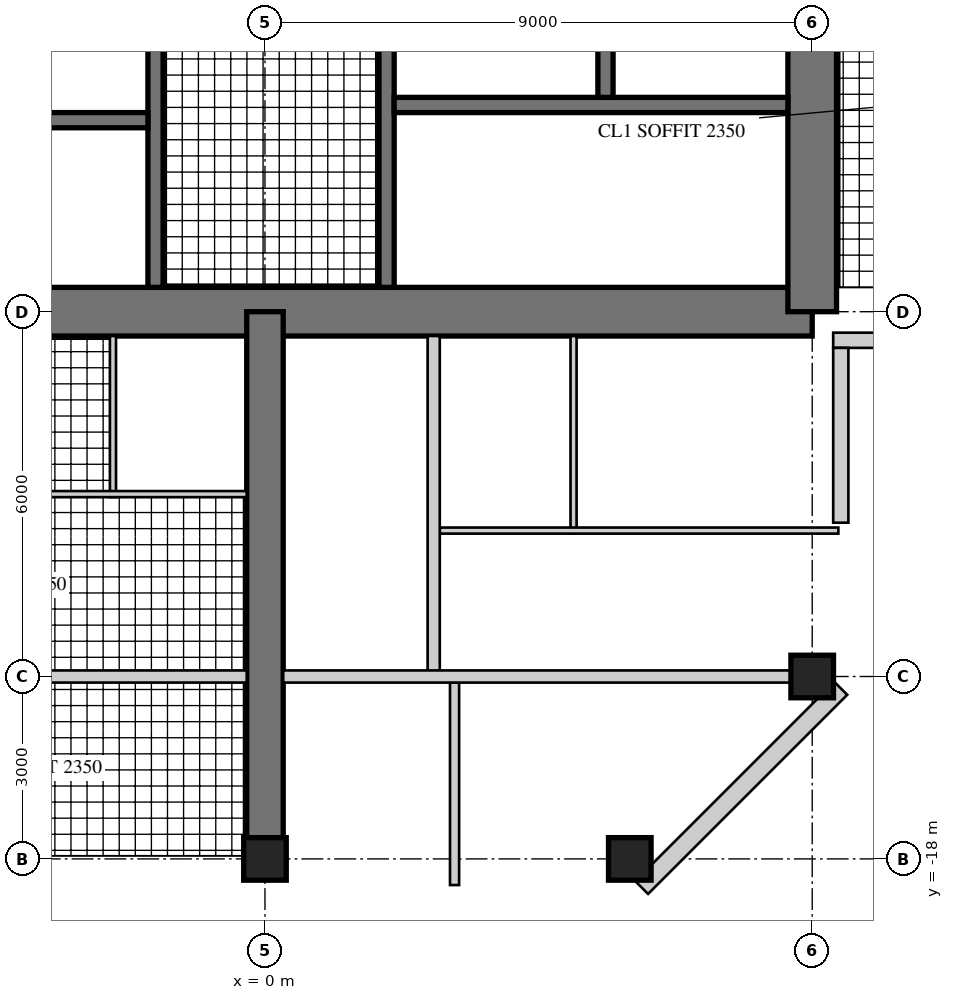
"""IFC4 building model, lengths in metres.
Left out: names, types, materials, properties, quantities, classifications, styles, units other than length and angle.
Written with IfcOpenShell. Run it as: python <this file> out.ifc"""

import sys

from ifc_helpers import new_model, si_unit, direction, frame, frame_2d, origin, origin_2d, place, context, subcontext, project, spatial, rectangle, hollow_rectangle, extrude, element, fill, save


model = new_model("IFC4")
c1 = context("Model", 3, precision=1e-05, world=origin(), true_north=direction((0.0, 1.0)))
c2 = subcontext(c1, "Body", "Model", "MODEL_VIEW")
j1 = project(units=[si_unit("LENGTHUNIT", "METRE"), si_unit("PLANEANGLEUNIT", "RADIAN")], contexts=[c1])
p1 = place(None, origin())
s1 = spatial("IfcSite", under=j1, at=p1, CompositionType="ELEMENT")
p2 = place(p1, origin())
s2 = spatial("IfcBuilding", under=s1, at=p2, CompositionType="ELEMENT")
p3 = place(p2, frame((0.0, 0.0, 261.1)))
s3 = spatial("IfcBuildingStorey", under=s2, at=p3, CompositionType="ELEMENT", Elevation=261.1)
p4 = place(p3, frame((-9.0, -9.0, 0.0), z_axis=(0.0, 0.0, 1.0), x_axis=(1.0, 0.0, 0.0)))
e1 = element("IfcWall", 1, at=p4, inside=s3, PredefinedType="SHEAR", context=c2, shape_type="SweptSolid", body=[
    extrude(rectangle(XDim=18.0, YDim=0.8, at=frame_2d((9.0, 0.0))), origin(), (0.0, 0.0, 1.0), 3.4),
])
p5 = place(p4, frame((9.8, 0.0, 0.0)))
e2 = element("IfcOpeningElement", 2, at=p5, cuts=e1, PredefinedType="OPENING", context=c2, shape_type="SweptSolid", body=[
    extrude(rectangle(XDim=1.0, YDim=2.4, at=frame_2d((0.5, 1.2))), frame((0.0, 0.41, 0.0), z_axis=(0.0, -1.0, 0.0), x_axis=(1.0, 0.0, 0.0)), (0.0, 0.0, 1.0), 0.82),
])
p6 = place(p3, frame((9.0, -9.0, 0.0), z_axis=(0.0, 0.0, 1.0), x_axis=(0.0, 1.0, 0.0)))
e3 = element("IfcWall", 3, at=p6, inside=s3, PredefinedType="SHEAR", context=c2, shape_type="SweptSolid", body=[
    extrude(rectangle(XDim=18.0, YDim=0.8, at=frame_2d((9.0, 0.0))), origin(), (0.0, 0.0, 1.0), 3.4),
])
p7 = place(p6, frame((9.8, 0.0, 0.0)))
e4 = element("IfcOpeningElement", 4, at=p7, cuts=e3, PredefinedType="OPENING", context=c2, shape_type="SweptSolid", body=[
    extrude(rectangle(XDim=1.0, YDim=2.4, at=frame_2d((0.5, 1.2))), frame((0.0, 0.41, 0.0), z_axis=(0.0, -1.0, 0.0), x_axis=(1.0, 0.0, 0.0)), (0.0, 0.0, 1.0), 0.82),
])
p8 = place(p3, frame((-1.8, -1.875, 0.0), z_axis=(0.0, 0.0, 1.0), x_axis=(0.0, -1.0, 0.0)))
e5 = element("IfcWall", 5, at=p8, inside=s3, PredefinedType="SHEAR", context=c2, shape_type="SweptSolid", body=[
    extrude(rectangle(XDim=6.725, YDim=0.25, at=frame_2d((3.363, 0.0))), origin(), (0.0, 0.0, 1.0), 3.4),
])
p9 = place(p8, frame((1.875, 0.0, 0.0)))
e6 = element("IfcOpeningElement", 6, at=p9, cuts=e5, PredefinedType="OPENING", context=c2, shape_type="SweptSolid", body=[
    extrude(rectangle(XDim=1.6, YDim=2.4, at=frame_2d((0.8, 1.2))), frame((0.0, 0.135, 0.0), z_axis=(0.0, -1.0, 0.0), x_axis=(1.0, 0.0, 0.0)), (0.0, 0.0, 1.0), 0.27),
])
p10 = place(p3, frame((-1.925, -5.85, 0.0), z_axis=(0.0, 0.0, 1.0), x_axis=(-1.0, 0.0, 0.0)))
e7 = element("IfcWall", 7, at=p10, inside=s3, PredefinedType="SHEAR", context=c2, shape_type="SweptSolid", body=[
    extrude(rectangle(XDim=6.675, YDim=0.25, at=frame_2d((3.337, 0.0))), origin(), (0.0, 0.0, 1.0), 3.4),
])
p11 = place(p10, frame((0.496, 0.0, 0.0)))
e8 = element("IfcOpeningElement", 8, at=p11, cuts=e7, PredefinedType="OPENING", context=c2, shape_type="SweptSolid", body=[
    extrude(rectangle(XDim=1.1, YDim=2.2, at=frame_2d((0.55, 1.1))), frame((0.0, 0.135, 0.0), z_axis=(0.0, -1.0, 0.0), x_axis=(1.0, 0.0, 0.0)), (0.0, 0.0, 1.0), 0.27),
])
p12 = place(p10, frame((2.788, 0.0, 0.0)))
e9 = element("IfcOpeningElement", 9, at=p12, cuts=e7, PredefinedType="OPENING", context=c2, shape_type="SweptSolid", body=[
    extrude(rectangle(XDim=1.1, YDim=2.2, at=frame_2d((0.55, 1.1))), frame((0.0, 0.135, 0.0), z_axis=(0.0, -1.0, 0.0), x_axis=(1.0, 0.0, 0.0)), (0.0, 0.0, 1.0), 0.27),
])
p13 = place(p10, frame((5.079, 0.0, 0.0)))
e10 = element("IfcOpeningElement", 10, at=p13, cuts=e7, PredefinedType="OPENING", context=c2, shape_type="SweptSolid", body=[
    extrude(rectangle(XDim=1.1, YDim=2.2, at=frame_2d((0.55, 1.1))), frame((0.0, 0.135, 0.0), z_axis=(0.0, -1.0, 0.0), x_axis=(1.0, 0.0, 0.0)), (0.0, 0.0, 1.0), 0.27),
])
p14 = place(p3, frame((2.0, -1.675, 0.0), z_axis=(0.0, 0.0, 1.0), x_axis=(0.0, -1.0, 0.0)))
e11 = element("IfcWall", 11, at=p14, inside=s3, PredefinedType="SHEAR", context=c2, shape_type="SweptSolid", body=[
    extrude(rectangle(XDim=6.925, YDim=0.25, at=frame_2d((3.462, 0.0))), origin(), (0.0, 0.0, 1.0), 3.4),
])
p15 = place(p14, frame((0.725, 0.0, 0.0)))
e12 = element("IfcOpeningElement", 12, at=p15, cuts=e11, PredefinedType="OPENING", context=c2, shape_type="SweptSolid", body=[
    extrude(rectangle(XDim=1.0, YDim=2.1, at=frame_2d((0.5, 1.05))), frame((0.0, 0.135, 0.0), z_axis=(0.0, -1.0, 0.0), x_axis=(1.0, 0.0, 0.0)), (0.0, 0.0, 1.0), 0.27),
])
p16 = place(p3, frame((2.125, -5.6, 0.0), z_axis=(0.0, 0.0, 1.0), x_axis=(1.0, 0.0, 0.0)))
e13 = element("IfcWall", 13, at=p16, inside=s3, PredefinedType="SHEAR", context=c2, shape_type="SweptSolid", body=[
    extrude(rectangle(XDim=6.475, YDim=0.25, at=frame_2d((3.238, 0.0))), origin(), (0.0, 0.0, 1.0), 3.4),
])
p17 = place(p16, frame((0.175, 0.0, 0.0)))
e14 = element("IfcOpeningElement", 14, at=p17, cuts=e13, PredefinedType="OPENING", context=c2, shape_type="SweptSolid", body=[
    extrude(rectangle(XDim=1.0, YDim=2.1, at=frame_2d((0.5, 1.05))), frame((0.0, 0.135, 0.0), z_axis=(0.0, -1.0, 0.0), x_axis=(1.0, 0.0, 0.0)), (0.0, 0.0, 1.0), 0.27),
])
p18 = place(p3, frame((5.6, -1.925, 0.0), z_axis=(0.0, 0.0, 1.0), x_axis=(0.0, -1.0, 0.0)))
e15 = element("IfcWall", 15, at=p18, inside=s3, PredefinedType="SHEAR", context=c2, shape_type="SweptSolid", body=[
    extrude(rectangle(XDim=3.55, YDim=0.25, at=frame_2d((1.775, 0.0))), origin(), (0.0, 0.0, 1.0), 3.4),
])
p19 = place(p18, frame((1.525, 0.0, 0.0)))
e16 = element("IfcOpeningElement", 16, at=p19, cuts=e15, PredefinedType="OPENING", context=c2, shape_type="SweptSolid", body=[
    extrude(rectangle(XDim=1.1, YDim=2.2, at=frame_2d((0.55, 1.1))), frame((0.0, 0.135, 0.0), z_axis=(0.0, -1.0, 0.0), x_axis=(1.0, 0.0, 0.0)), (0.0, 0.0, 1.0), 0.27),
])
p20 = place(p18, frame((0.075, 0.0, 0.0)))
e17 = element("IfcOpeningElement", 17, at=p20, cuts=e15, PredefinedType="OPENING", context=c2, shape_type="SweptSolid", body=[
    extrude(rectangle(XDim=0.8, YDim=2.1, at=frame_2d((0.4, 1.05))), frame((0.0, 0.135, 0.0), z_axis=(0.0, -1.0, 0.0), x_axis=(1.0, 0.0, 0.0)), (0.0, 0.0, 1.0), 0.27),
])
p21 = place(p3, frame((0.0, -9.0, 0.0), z_axis=(0.0, 0.0, 1.0), x_axis=(0.0, -1.0, 0.0)))
e18 = element("IfcWall", 18, at=p21, inside=s3, PredefinedType="SHEAR", context=c2, shape_type="SweptSolid", body=[
    extrude(rectangle(XDim=9.0, YDim=0.6, at=frame_2d((4.5, 0.0))), origin(), (0.0, 0.0, 1.0), 3.4),
])
p22 = place(p21, frame((3.8, 0.0, 0.0)))
e19 = element("IfcOpeningElement", 19, at=p22, cuts=e18, PredefinedType="OPENING", context=c2, shape_type="SweptSolid", body=[
    extrude(rectangle(XDim=1.0, YDim=2.15, at=frame_2d((0.5, 1.075))), frame((0.0, 0.31, 0.0), z_axis=(0.0, -1.0, 0.0), x_axis=(1.0, 0.0, 0.0)), (0.0, 0.0, 1.0), 0.62),
])
p23 = place(p21, frame((7.0, 0.0, 0.0)))
e20 = element("IfcOpeningElement", 20, at=p23, cuts=e18, PredefinedType="OPENING", context=c2, shape_type="SweptSolid", body=[
    extrude(rectangle(XDim=1.0, YDim=2.2, at=frame_2d((0.5, 1.1))), frame((0.0, 0.31, 0.0), z_axis=(0.0, -1.0, 0.0), x_axis=(1.0, 0.0, 0.0)), (0.0, 0.0, 1.0), 0.62),
])
for number, where, z_axis, x_axis in (
    (21, (9.0, -15.0, 0.0), (0.0, 0.0, 1.0), (1.0, 0.0, 0.0)),
    (22, (0.0, -18.0, 0.0), (0.0, 0.0, 1.0), (1.0, 0.0, 0.0)),
    (23, (6.0, -18.0, 0.0), (0.0, 0.0, 1.0), (1.0, 0.0, 0.0)),
):
    element("IfcColumn", number, at=place(p3, frame(where, z_axis=z_axis, x_axis=x_axis)), inside=s3, PredefinedType="COLUMN", context=c2, shape_type="SweptSolid", body=[
        extrude(rectangle(XDim=0.7, YDim=0.7, at=origin_2d()), origin(), (0.0, 0.0, 1.0), 3.4),
    ])
p24 = place(p3, frame((9.345, -9.47, 0.0), z_axis=(0.0, 0.0, 1.0), x_axis=(1.0, 0.0, 0.0)))
e24 = element("IfcWall", 24, at=p24, inside=s3, PredefinedType="SOLIDWALL", context=c2, shape_type="SweptSolid", body=[
    extrude(rectangle(XDim=3.125, YDim=0.25, at=frame_2d((1.562, 0.0))), origin(), (0.0, 0.0, 1.0), 3.22),
])
p25 = place(p24, frame((0.6, 0.0, 0.0)))
e25 = element("IfcOpeningElement", 25, at=p25, cuts=e24, PredefinedType="OPENING", context=c2, shape_type="SweptSolid", body=[
    extrude(rectangle(XDim=1.0, YDim=2.2, at=frame_2d((0.5, 1.1))), frame((0.0, 0.135, 0.0), z_axis=(0.0, -1.0, 0.0), x_axis=(1.0, 0.0, 0.0)), (0.0, 0.0, 1.0), 0.27),
])
p26 = place(p3, frame((6.195, -18.47, 0.0), z_axis=(0.0, 0.0, 1.0), x_axis=(0.707106781187, 0.707106781187, 0.0)))
e26 = element("IfcWall", 26, at=p26, inside=s3, PredefinedType="SOLIDWALL", context=c2, shape_type="SweptSolid", body=[
    extrude(rectangle(XDim=4.632, YDim=0.3, at=frame_2d((2.316, 0.0))), origin(), (0.0, 0.0, 1.0), 3.22),
])
p27 = place(p26, frame((1.866, 0.0, 0.3)))
e27 = element("IfcOpeningElement", 27, at=p27, cuts=e26, PredefinedType="OPENING", context=c2, shape_type="SweptSolid", body=[
    extrude(rectangle(XDim=0.9, YDim=2.4, at=frame_2d((0.45, 1.2))), frame((0.0, 0.16, 0.0), z_axis=(0.0, -1.0, 0.0), x_axis=(1.0, 0.0, 0.0)), (0.0, 0.0, 1.0), 0.32),
])
p28 = place(p3, frame((9.47, -12.47, 0.0), z_axis=(0.0, 0.0, 1.0), x_axis=(0.0, 1.0, 0.0)))
e28 = element("IfcWall", 28, at=p28, inside=s3, PredefinedType="SOLIDWALL", context=c2, shape_type="SweptSolid", body=[
    extrude(rectangle(XDim=2.875, YDim=0.25, at=frame_2d((1.438, 0.0))), origin(), (0.0, 0.0, 1.0), 3.22),
])
p29 = place(p28, frame((0.6, 0.0, 0.0)))
e29 = element("IfcOpeningElement", 29, at=p29, cuts=e28, PredefinedType="OPENING", context=c2, shape_type="SweptSolid", body=[
    extrude(rectangle(XDim=1.0, YDim=2.2, at=frame_2d((0.5, 1.1))), frame((0.0, 0.135, 0.0), z_axis=(0.0, -1.0, 0.0), x_axis=(1.0, 0.0, 0.0)), (0.0, 0.0, 1.0), 0.27),
])
p30 = place(p3, frame((5.075, -9.4, 0.0), z_axis=(0.0, 0.0, 1.0), x_axis=(0.0, -1.0, 0.0)))
e30 = element("IfcWall", 30, at=p30, inside=s3, PredefinedType="PARTITIONING", context=c2, shape_type="SweptSolid", body=[
    extrude(rectangle(XDim=3.25, YDim=0.1, at=frame_2d((1.625, 0.0))), origin(), (0.0, 0.0, 1.0), 3.22),
])
p31 = place(p3, frame((2.875, -12.6, 0.0), z_axis=(0.0, 0.0, 1.0), x_axis=(1.0, 0.0, 0.0)))
e31 = element("IfcWall", 31, at=p31, inside=s3, PredefinedType="PARTITIONING", context=c2, shape_type="SweptSolid", body=[
    extrude(rectangle(XDim=6.555, YDim=0.1, at=frame_2d((3.277, 0.0))), origin(), (0.0, 0.0, 1.0), 3.22),
])
p32 = place(p31, frame((0.55, 0.0, 0.0)))
e32 = element("IfcOpeningElement", 32, at=p32, cuts=e31, PredefinedType="OPENING", context=c2, shape_type="SweptSolid", body=[
    extrude(rectangle(XDim=0.9, YDim=2.1, at=frame_2d((0.45, 1.05))), frame((0.0, 0.06, 0.0), z_axis=(0.0, -1.0, 0.0), x_axis=(1.0, 0.0, 0.0)), (0.0, 0.0, 1.0), 0.12),
])
p33 = place(p31, frame((2.65, 0.0, 0.0)))
e33 = element("IfcOpeningElement", 33, at=p33, cuts=e31, PredefinedType="OPENING", context=c2, shape_type="SweptSolid", body=[
    extrude(rectangle(XDim=0.9, YDim=2.1, at=frame_2d((0.45, 1.05))), frame((0.0, 0.06, 0.0), z_axis=(0.0, -1.0, 0.0), x_axis=(1.0, 0.0, 0.0)), (0.0, 0.0, 1.0), 0.12),
])
p34 = place(p3, frame((-2.5, -9.4, 0.0), z_axis=(0.0, 0.0, 1.0), x_axis=(0.0, -1.0, 0.0)))
e34 = element("IfcWall", 34, at=p34, inside=s3, PredefinedType="PARTITIONING", context=c2, shape_type="SweptSolid", body=[
    extrude(rectangle(XDim=2.65, YDim=0.1, at=frame_2d((1.325, 0.0))), origin(), (0.0, 0.0, 1.0), 3.22),
])
p35 = place(p3, frame((-9.345, -12.0, 0.0), z_axis=(0.0, 0.0, 1.0), x_axis=(1.0, 0.0, 0.0)))
e35 = element("IfcWall", 35, at=p35, inside=s3, PredefinedType="PARTITIONING", context=c2, shape_type="SweptSolid", body=[
    extrude(rectangle(XDim=9.045, YDim=0.1, at=frame_2d((4.522, 0.0))), origin(), (0.0, 0.0, 1.0), 3.22),
])
p36 = place(p35, frame((5.495, 0.0, 0.0)))
e36 = element("IfcOpeningElement", 36, at=p36, cuts=e35, PredefinedType="OPENING", context=c2, shape_type="SweptSolid", body=[
    extrude(rectangle(XDim=0.9, YDim=2.1, at=frame_2d((0.45, 1.05))), frame((0.0, 0.06, 0.0), z_axis=(0.0, -1.0, 0.0), x_axis=(1.0, 0.0, 0.0)), (0.0, 0.0, 1.0), 0.12),
])
p37 = place(p35, frame((7.595, 0.0, 0.0)))
e37 = element("IfcOpeningElement", 37, at=p37, cuts=e35, PredefinedType="OPENING", context=c2, shape_type="SweptSolid", body=[
    extrude(rectangle(XDim=0.9, YDim=2.1, at=frame_2d((0.45, 1.05))), frame((0.0, 0.06, 0.0), z_axis=(0.0, -1.0, 0.0), x_axis=(1.0, 0.0, 0.0)), (0.0, 0.0, 1.0), 0.12),
])
p38 = place(p3, frame((2.775, -9.4, 0.0), z_axis=(0.0, 0.0, 1.0), x_axis=(0.0, -1.0, 0.0)))
e38 = element("IfcWall", 38, at=p38, inside=s3, PredefinedType="SOLIDWALL", context=c2, shape_type="SweptSolid", body=[
    extrude(rectangle(XDim=5.6, YDim=0.2, at=frame_2d((2.8, 0.0))), origin(), (0.0, 0.0, 1.0), 3.22),
])
p39 = place(p38, frame((3.75, 0.0, 0.0)))
e39 = element("IfcOpeningElement", 39, at=p39, cuts=e38, PredefinedType="OPENING", context=c2, shape_type="SweptSolid", body=[
    extrude(rectangle(XDim=1.0, YDim=2.15, at=frame_2d((0.5, 1.075))), frame((0.0, 0.11, 0.0), z_axis=(0.0, -1.0, 0.0), x_axis=(1.0, 0.0, 0.0)), (0.0, 0.0, 1.0), 0.22),
])
p40 = place(p3, frame((3.118, -15.1, 0.0), z_axis=(0.0, 0.0, 1.0), x_axis=(0.0, -1.0, 0.0)))
e40 = element("IfcWall", 40, at=p40, inside=s3, PredefinedType="PARTITIONING", context=c2, shape_type="SweptSolid", body=[
    extrude(rectangle(XDim=3.33, YDim=0.15, at=frame_2d((1.665, 0.0))), origin(), (0.0, 0.0, 1.0), 3.22),
])
p41 = place(p40, frame((0.6, 0.0, 0.0)))
e41 = element("IfcOpeningElement", 41, at=p41, cuts=e40, PredefinedType="OPENING", context=c2, shape_type="SweptSolid", body=[
    extrude(rectangle(XDim=1.0, YDim=2.1, at=frame_2d((0.5, 1.05))), frame((0.0, 0.085, 0.0), z_axis=(0.0, -1.0, 0.0), x_axis=(1.0, 0.0, 0.0)), (0.0, 0.0, 1.0), 0.17),
])
p42 = place(p3, frame((-8.65, -15.0, 0.0), z_axis=(0.0, 0.0, 1.0), x_axis=(1.0, 0.0, 0.0)))
e42 = element("IfcWall", 42, at=p42, inside=s3, PredefinedType="SOLIDWALL", context=c2, shape_type="SweptSolid", body=[
    extrude(rectangle(XDim=8.35, YDim=0.2, at=frame_2d((4.175, 0.0))), origin(), (0.0, 0.0, 1.0), 2.52),
])
p43 = place(p3, frame((0.3, -15.0, 0.0), z_axis=(0.0, 0.0, 1.0), x_axis=(1.0, 0.0, 0.0)))
e43 = element("IfcWall", 43, at=p43, inside=s3, PredefinedType="SOLIDWALL", context=c2, shape_type="SweptSolid", body=[
    extrude(rectangle(XDim=8.35, YDim=0.2, at=frame_2d((4.175, 0.0))), origin(), (0.0, 0.0, 1.0), 2.52),
])
p44 = place(p43, frame((0.4, 0.0, 0.0)))
e44 = element("IfcOpeningElement", 44, at=p44, cuts=e43, PredefinedType="OPENING", context=c2, shape_type="SweptSolid", body=[
    extrude(rectangle(XDim=1.0, YDim=2.2, at=frame_2d((0.5, 1.1))), frame((0.0, 0.11, 0.0), z_axis=(0.0, -1.0, 0.0), x_axis=(1.0, 0.0, 0.0)), (0.0, 0.0, 1.0), 0.22),
])
p45 = place(p25, origin())
e45 = element("IfcDoor", 45, at=p45, inside=s3, OperationType="SINGLE_SWING_LEFT", PredefinedType="DOOR", context=c2, shape_type="SweptSolid", body=[
    extrude(hollow_rectangle(XDim=1.0, YDim=2.2, WallThickness=0.06, at=frame_2d((0.5, 1.1))), frame((0.0, 0.025, 0.0), z_axis=(0.0, -1.0, 0.0), x_axis=(1.0, 0.0, 0.0)), (0.0, 0.0, 1.0), 0.05),
    extrude(rectangle(XDim=0.879, YDim=2.079, at=frame_2d((0.5, 1.1))), frame((0.0, 0.025, 0.0), z_axis=(0.0, -1.0, 0.0), x_axis=(1.0, 0.0, 0.0)), (0.0, 0.0, 1.0), 0.05),
])
fill(e25, e45)
p46 = place(p27, origin())
e46 = element("IfcWindow", 46, at=p46, inside=s3, PartitioningType="SINGLE_PANEL", PredefinedType="WINDOW", context=c2, shape_type="SweptSolid", body=[
    extrude(hollow_rectangle(XDim=0.9, YDim=2.4, WallThickness=0.06, at=frame_2d((0.45, 1.2))), frame((0.0, 0.03, 0.0), z_axis=(0.0, -1.0, 0.0), x_axis=(1.0, 0.0, 0.0)), (0.0, 0.0, 1.0), 0.06),
    extrude(rectangle(XDim=0.779, YDim=2.279, at=frame_2d((0.45, 1.2))), frame((0.0, 0.03, 0.0), z_axis=(0.0, -1.0, 0.0), x_axis=(1.0, 0.0, 0.0)), (0.0, 0.0, 1.0), 0.06),
])
fill(e27, e46)
p47 = place(p29, origin())
e47 = element("IfcDoor", 47, at=p47, inside=s3, OperationType="SINGLE_SWING_LEFT", PredefinedType="DOOR", context=c2, shape_type="SweptSolid", body=[
    extrude(hollow_rectangle(XDim=1.0, YDim=2.2, WallThickness=0.06, at=frame_2d((0.5, 1.1))), frame((0.0, 0.025, 0.0), z_axis=(0.0, -1.0, 0.0), x_axis=(1.0, 0.0, 0.0)), (0.0, 0.0, 1.0), 0.05),
    extrude(rectangle(XDim=0.879, YDim=2.079, at=frame_2d((0.5, 1.1))), frame((0.0, 0.025, 0.0), z_axis=(0.0, -1.0, 0.0), x_axis=(1.0, 0.0, 0.0)), (0.0, 0.0, 1.0), 0.05),
])
fill(e29, e47)
p48 = place(p32, origin())
e48 = element("IfcDoor", 48, at=p48, inside=s3, OperationType="SINGLE_SWING_LEFT", PredefinedType="DOOR", context=c2, shape_type="SweptSolid", body=[
    extrude(rectangle(XDim=0.9, YDim=2.1, at=frame_2d((0.45, 1.05))), frame((0.0, 0.025, 0.0), z_axis=(0.0, -1.0, 0.0), x_axis=(1.0, 0.0, 0.0)), (0.0, 0.0, 1.0), 0.05),
])
fill(e32, e48)
p49 = place(p33, origin())
e49 = element("IfcDoor", 49, at=p49, inside=s3, OperationType="SINGLE_SWING_LEFT", PredefinedType="DOOR", context=c2, shape_type="SweptSolid", body=[
    extrude(rectangle(XDim=0.9, YDim=2.1, at=frame_2d((0.45, 1.05))), frame((0.0, 0.025, 0.0), z_axis=(0.0, -1.0, 0.0), x_axis=(1.0, 0.0, 0.0)), (0.0, 0.0, 1.0), 0.05),
])
fill(e33, e49)
p50 = place(p36, origin())
e50 = element("IfcDoor", 50, at=p50, inside=s3, OperationType="SINGLE_SWING_RIGHT", PredefinedType="DOOR", context=c2, shape_type="SweptSolid", body=[
    extrude(rectangle(XDim=0.9, YDim=2.1, at=frame_2d((0.45, 1.05))), frame((0.0, 0.025, 0.0), z_axis=(0.0, -1.0, 0.0), x_axis=(1.0, 0.0, 0.0)), (0.0, 0.0, 1.0), 0.05),
])
fill(e36, e50)
p51 = place(p37, origin())
e51 = element("IfcDoor", 51, at=p51, inside=s3, OperationType="SINGLE_SWING_RIGHT", PredefinedType="DOOR", context=c2, shape_type="SweptSolid", body=[
    extrude(rectangle(XDim=0.9, YDim=2.1, at=frame_2d((0.45, 1.05))), frame((0.0, 0.025, 0.0), z_axis=(0.0, -1.0, 0.0), x_axis=(1.0, 0.0, 0.0)), (0.0, 0.0, 1.0), 0.05),
])
fill(e37, e51)
p52 = place(p39, origin())
e52 = element("IfcDoor", 52, at=p52, inside=s3, OperationType="SINGLE_SWING_LEFT", PredefinedType="DOOR", context=c2, shape_type="SweptSolid", body=[
    extrude(rectangle(XDim=1.0, YDim=2.15, at=frame_2d((0.5, 1.075))), frame((0.0, 0.025, 0.0), z_axis=(0.0, -1.0, 0.0), x_axis=(1.0, 0.0, 0.0)), (0.0, 0.0, 1.0), 0.05),
])
fill(e39, e52)
p53 = place(p41, frame((1.0, 0.0, 0.0), z_axis=(0.0, 0.0, 1.0), x_axis=(-1.0, 0.0, 0.0)))
e53 = element("IfcDoor", 53, at=p53, inside=s3, OperationType="SINGLE_SWING_RIGHT", PredefinedType="DOOR", context=c2, shape_type="SweptSolid", body=[
    extrude(rectangle(XDim=1.0, YDim=2.1, at=frame_2d((0.5, 1.05))), frame((0.0, 0.025, 0.0), z_axis=(0.0, -1.0, 0.0), x_axis=(1.0, 0.0, 0.0)), (0.0, 0.0, 1.0), 0.05),
])
fill(e41, e53)
p54 = place(p44, frame((1.0, 0.0, 0.0), z_axis=(0.0, 0.0, 1.0), x_axis=(-1.0, 0.0, 0.0)))
e54 = element("IfcDoor", 54, at=p54, inside=s3, OperationType="SINGLE_SWING_LEFT", PredefinedType="DOOR", context=c2, shape_type="SweptSolid", body=[
    extrude(rectangle(XDim=1.0, YDim=2.2, at=frame_2d((0.5, 1.1))), frame((0.0, 0.025, 0.0), z_axis=(0.0, -1.0, 0.0), x_axis=(1.0, 0.0, 0.0)), (0.0, 0.0, 1.0), 0.05),
])
fill(e44, e54)
p55 = place(p22, frame((1.0, 0.0, 0.0), z_axis=(0.0, 0.0, 1.0), x_axis=(-1.0, 0.0, 0.0)))
e55 = element("IfcDoor", 55, at=p55, inside=s3, OperationType="SINGLE_SWING_RIGHT", PredefinedType="DOOR", context=c2, shape_type="SweptSolid", body=[
    extrude(rectangle(XDim=1.0, YDim=2.15, at=frame_2d((0.5, 1.075))), frame((0.0, 0.025, 0.0), z_axis=(0.0, -1.0, 0.0), x_axis=(1.0, 0.0, 0.0)), (0.0, 0.0, 1.0), 0.05),
])
fill(e19, e55)
p56 = place(p23, origin())
e56 = element("IfcDoor", 56, at=p56, inside=s3, OperationType="SINGLE_SWING_LEFT", PredefinedType="DOOR", context=c2, shape_type="SweptSolid", body=[
    extrude(rectangle(XDim=1.0, YDim=2.2, at=frame_2d((0.5, 1.1))), frame((0.0, 0.025, 0.0), z_axis=(0.0, -1.0, 0.0), x_axis=(1.0, 0.0, 0.0)), (0.0, 0.0, 1.0), 0.05),
])
fill(e20, e56)
p57 = place(p5, origin())
e57 = element("IfcDoor", 57, at=p57, inside=s3, OperationType="SINGLE_SWING_RIGHT", PredefinedType="DOOR", context=c2, shape_type="SweptSolid", body=[
    extrude(rectangle(XDim=1.0, YDim=2.4, at=frame_2d((0.5, 1.2))), frame((0.0, 0.055, 0.0), z_axis=(0.0, -1.0, 0.0), x_axis=(1.0, 0.0, 0.0)), (0.0, 0.0, 1.0), 0.05),
])
fill(e2, e57)
p58 = place(p11, origin())
e58 = element("IfcDoor", 58, at=p58, inside=s3, OperationType="DOUBLE_DOOR_SLIDING", PredefinedType="DOOR", context=c2, shape_type="SweptSolid", body=[
    extrude(rectangle(XDim=1.1, YDim=2.2, at=frame_2d((0.55, 1.1))), frame((0.0, 0.025, 0.0), z_axis=(0.0, -1.0, 0.0), x_axis=(1.0, 0.0, 0.0)), (0.0, 0.0, 1.0), 0.05),
])
fill(e8, e58)
p59 = place(p9, origin())
e59 = element("IfcDoor", 59, at=p59, inside=s3, OperationType="DOUBLE_DOOR_DOUBLE_SWING", PredefinedType="DOOR", context=c2, shape_type="SweptSolid", body=[
    extrude(rectangle(XDim=1.6, YDim=2.4, at=frame_2d((0.8, 1.2))), frame((0.0, 0.025, 0.0), z_axis=(0.0, -1.0, 0.0), x_axis=(1.0, 0.0, 0.0)), (0.0, 0.0, 1.0), 0.05),
])
fill(e6, e59)
p60 = place(p17, frame((1.0, 0.0, 0.0), z_axis=(0.0, 0.0, 1.0), x_axis=(-1.0, 0.0, 0.0)))
e60 = element("IfcDoor", 60, at=p60, inside=s3, OperationType="SINGLE_SWING_RIGHT", PredefinedType="DOOR", context=c2, shape_type="SweptSolid", body=[
    extrude(rectangle(XDim=1.0, YDim=2.1, at=frame_2d((0.5, 1.05))), frame((0.0, 0.025, 0.0), z_axis=(0.0, -1.0, 0.0), x_axis=(1.0, 0.0, 0.0)), (0.0, 0.0, 1.0), 0.05),
])
fill(e14, e60)
save(model, sys.argv[1])
